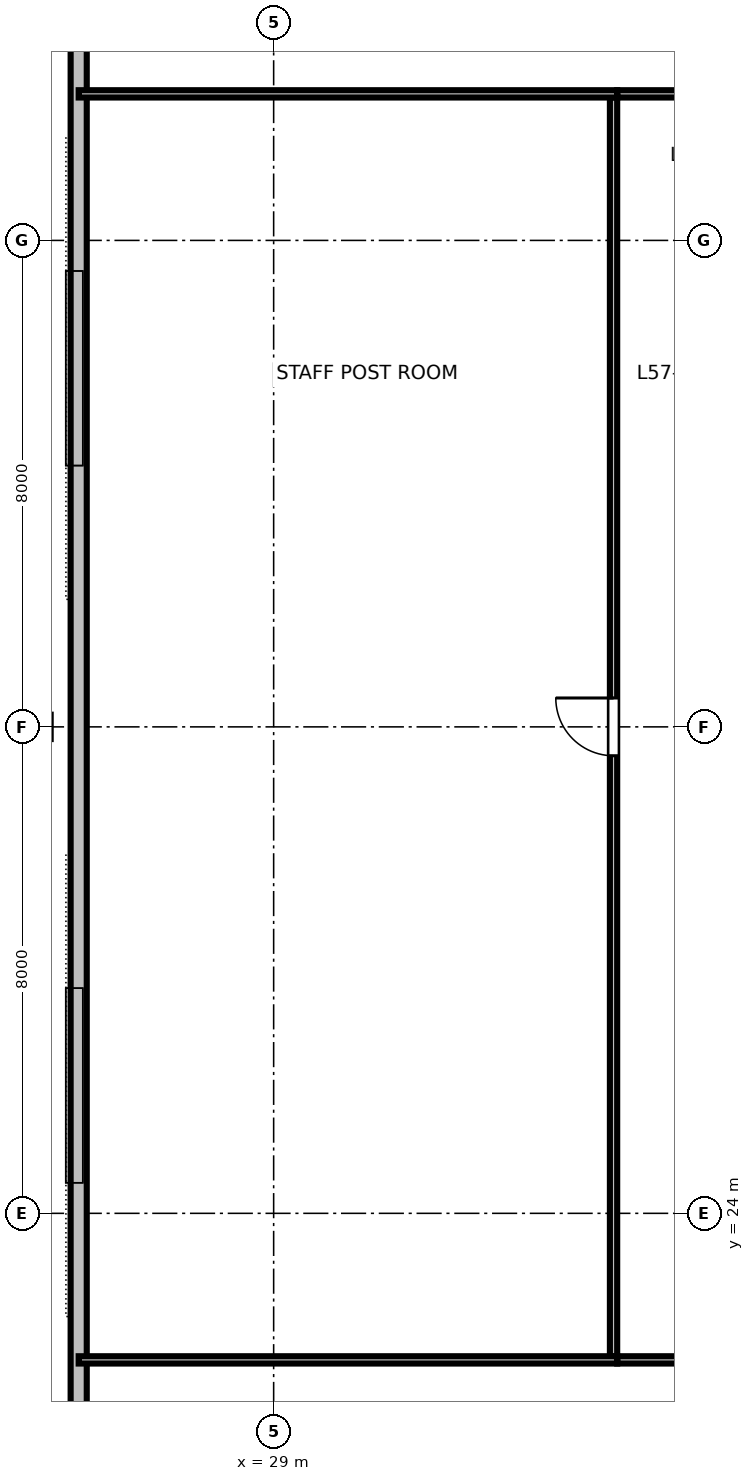
"""IFC4 building model, lengths in metres.
Left out: names, types, materials, properties, quantities, classifications, styles, units other than length and angle.
Written with IfcOpenShell. Run it as: python <this file> out.ifc"""

import sys

from ifc_helpers import new_model, si_unit, direction, frame, frame_2d, origin, origin_2d, place, context, subcontext, project, spatial, rectangle, hollow_rectangle, i_section, extrude, element, fill, save


model = new_model("IFC4")
c1 = context("Model", 3, precision=1e-05, world=origin(), true_north=direction((0.0, 1.0)))
c2 = subcontext(c1, "Body", "Model", "MODEL_VIEW")
j1 = project(units=[si_unit("LENGTHUNIT", "METRE"), si_unit("PLANEANGLEUNIT", "RADIAN")], contexts=[c1])
p1 = place(None, origin())
s1 = spatial("IfcSite", under=j1, at=p1, CompositionType="ELEMENT")
p2 = place(p1, origin())
s2 = spatial("IfcBuilding", under=s1, at=p2, CompositionType="ELEMENT")
p3 = place(p2, frame((0.0, 0.0, 216.6)))
s3 = spatial("IfcBuildingStorey", under=s2, at=p3, CompositionType="ELEMENT", Elevation=216.6)
p4 = place(p3, frame((25.037, 44.095, 0.0), z_axis=(0.177528506803, -0.155864964768, 0.97169426366), x_axis=(-0.730198143029, 0.641093139838, 0.236241947947)))
e1 = element("IfcColumn", 1, at=p4, inside=s3, PredefinedType="COLUMN", context=c2, shape_type="SweptSolid", body=[
    extrude(hollow_rectangle(XDim=0.7, YDim=0.85, WallThickness=0.04, at=origin_2d()), origin(), (0.0, 0.0, 1.0), 3.471),
])
p5 = place(p3, frame((25.134, 32.0, 0.0), z_axis=(0.17903584331, 0.0, 0.98384255184), x_axis=(-0.98384255184, 0.0, 0.17903584331)))
e2 = element("IfcColumn", 2, at=p5, inside=s3, PredefinedType="COLUMN", context=c2, shape_type="SweptSolid", body=[
    extrude(i_section(OverallWidth=0.401, OverallDepth=0.399, WebThickness=0.025, FlangeThickness=0.04, FilletRadius=0.025, at=origin_2d()), origin(), (0.0, 0.0, 1.0), 3.428),
])
p6 = place(p3, frame((25.037, 19.905, 0.0), z_axis=(0.177528506803, 0.155864964768, 0.97169426366), x_axis=(-0.730198143029, -0.641093139838, 0.236241947947)))
e3 = element("IfcColumn", 3, at=p6, inside=s3, PredefinedType="COLUMN", context=c2, shape_type="SweptSolid", body=[
    extrude(hollow_rectangle(XDim=0.7, YDim=0.85, WallThickness=0.04, at=origin_2d()), origin(), (0.0, 0.0, 1.0), 3.471),
])
p7 = place(p3, frame((25.794, 44.695, 0.0), z_axis=(0.0, 0.0, 1.0), x_axis=(0.0, -1.0, 0.0)))
e4 = element("IfcWall", 4, at=p7, inside=s3, PredefinedType="STANDARD", context=c2, shape_type="SweptSolid", body=[
    extrude(rectangle(XDim=25.389, YDim=0.265, at=frame_2d((12.695, 0.0))), origin(), (0.0, 0.0, 1.0), 2.832),
])
p8 = place(p3, frame((34.65, 21.59, 0.0), z_axis=(0.0, 0.0, 1.0), x_axis=(1.0, 0.0, 0.0)))
e5 = element("IfcWall", 5, at=p8, inside=s3, PredefinedType="PARTITIONING", context=c2, shape_type="SweptSolid", body=[
    extrude(rectangle(XDim=10.33, YDim=0.12, at=frame_2d((5.165, 0.0))), origin(), (0.0, 0.0, 1.0), 2.655),
])
p9 = place(p8, frame((2.69, 0.0, 0.0)))
e6 = element("IfcOpeningElement", 6, at=p9, cuts=e5, PredefinedType="OPENING", context=c2, shape_type="SweptSolid", body=[
    extrude(rectangle(XDim=0.95, YDim=2.15, at=frame_2d((0.475, 1.075))), frame((0.0, 0.07, 0.0), z_axis=(0.0, -1.0, 0.0), x_axis=(1.0, 0.0, 0.0)), (0.0, 0.0, 1.0), 0.14),
])
p10 = place(p8, frame((7.393, 0.0, 0.0)))
e7 = element("IfcOpeningElement", 7, at=p10, cuts=e5, PredefinedType="OPENING", context=c2, shape_type="SweptSolid", body=[
    extrude(rectangle(XDim=0.95, YDim=2.15, at=frame_2d((0.475, 1.075))), frame((0.0, 0.07, 0.0), z_axis=(0.0, -1.0, 0.0), x_axis=(1.0, 0.0, 0.0)), (0.0, 0.0, 1.0), 0.14),
])
p11 = place(p3, frame((34.65, 42.41, 0.0), z_axis=(0.0, 0.0, 1.0), x_axis=(1.0, 0.0, 0.0)))
e8 = element("IfcWall", 8, at=p11, inside=s3, PredefinedType="PARTITIONING", context=c2, shape_type="SweptSolid", body=[
    extrude(rectangle(XDim=10.33, YDim=0.12, at=frame_2d((5.165, 0.0))), origin(), (0.0, 0.0, 1.0), 2.655),
])
p12 = place(p11, frame((3.674, 0.0, 0.0)))
e9 = element("IfcOpeningElement", 9, at=p12, cuts=e8, PredefinedType="OPENING", context=c2, shape_type="SweptSolid", body=[
    extrude(rectangle(XDim=0.95, YDim=2.15, at=frame_2d((0.475, 1.075))), frame((0.0, 0.07, 0.0), z_axis=(0.0, -1.0, 0.0), x_axis=(1.0, 0.0, 0.0)), (0.0, 0.0, 1.0), 0.14),
])
p13 = place(p11, frame((8.769, 0.0, 0.0)))
e10 = element("IfcOpeningElement", 10, at=p13, cuts=e8, PredefinedType="OPENING", context=c2, shape_type="SweptSolid", body=[
    extrude(rectangle(XDim=0.95, YDim=2.15, at=frame_2d((0.475, 1.075))), frame((0.0, 0.07, 0.0), z_axis=(0.0, -1.0, 0.0), x_axis=(1.0, 0.0, 0.0)), (0.0, 0.0, 1.0), 0.14),
])
p14 = place(p3, frame((34.59, 21.65, 0.0), z_axis=(0.0, 0.0, 1.0), x_axis=(0.0, 1.0, 0.0)))
e11 = element("IfcWall", 11, at=p14, inside=s3, PredefinedType="PARTITIONING", context=c2, shape_type="SweptSolid", body=[
    extrude(rectangle(XDim=20.7, YDim=0.12, at=frame_2d((10.35, 0.0))), origin(), (0.0, 0.0, 1.0), 2.655),
])
p15 = place(p14, frame((9.875, 0.0, 0.0)))
e12 = element("IfcOpeningElement", 12, at=p15, cuts=e11, PredefinedType="OPENING", context=c2, shape_type="SweptSolid", body=[
    extrude(rectangle(XDim=0.95, YDim=2.15, at=frame_2d((0.475, 1.075))), frame((0.0, 0.07, 0.0), z_axis=(0.0, -1.0, 0.0), x_axis=(1.0, 0.0, 0.0)), (0.0, 0.0, 1.0), 0.14),
])
for number, where, z_axis, x_axis in (
    (13, (34.65, 21.59, 0.0), (0.0, 0.0, 1.0), (-1.0, 0.0, 0.0)),
    (14, (34.65, 42.41, 0.0), (0.0, 0.0, 1.0), (-1.0, 0.0, 0.0)),
):
    element("IfcWall", number, at=place(p3, frame(where, z_axis=z_axis, x_axis=x_axis)), inside=s3, PredefinedType="PARTITIONING", context=c2, shape_type="SweptSolid", body=[
        extrude(rectangle(XDim=8.856, YDim=0.12, at=frame_2d((4.428, 0.0))), origin(), (0.0, 0.0, 1.0), 2.655),
    ])
p16 = place(p15, origin())
e15 = element("IfcDoor", 15, at=p16, inside=s3, OperationType="SINGLE_SWING_RIGHT", PredefinedType="DOOR", context=c2, shape_type="SweptSolid", body=[
    extrude(rectangle(XDim=0.95, YDim=2.15, at=frame_2d((0.475, 1.075))), frame((0.0, 0.025, 0.0), z_axis=(0.0, -1.0, 0.0), x_axis=(1.0, 0.0, 0.0)), (0.0, 0.0, 1.0), 0.05),
])
fill(e12, e15)
save(model, sys.argv[1])
